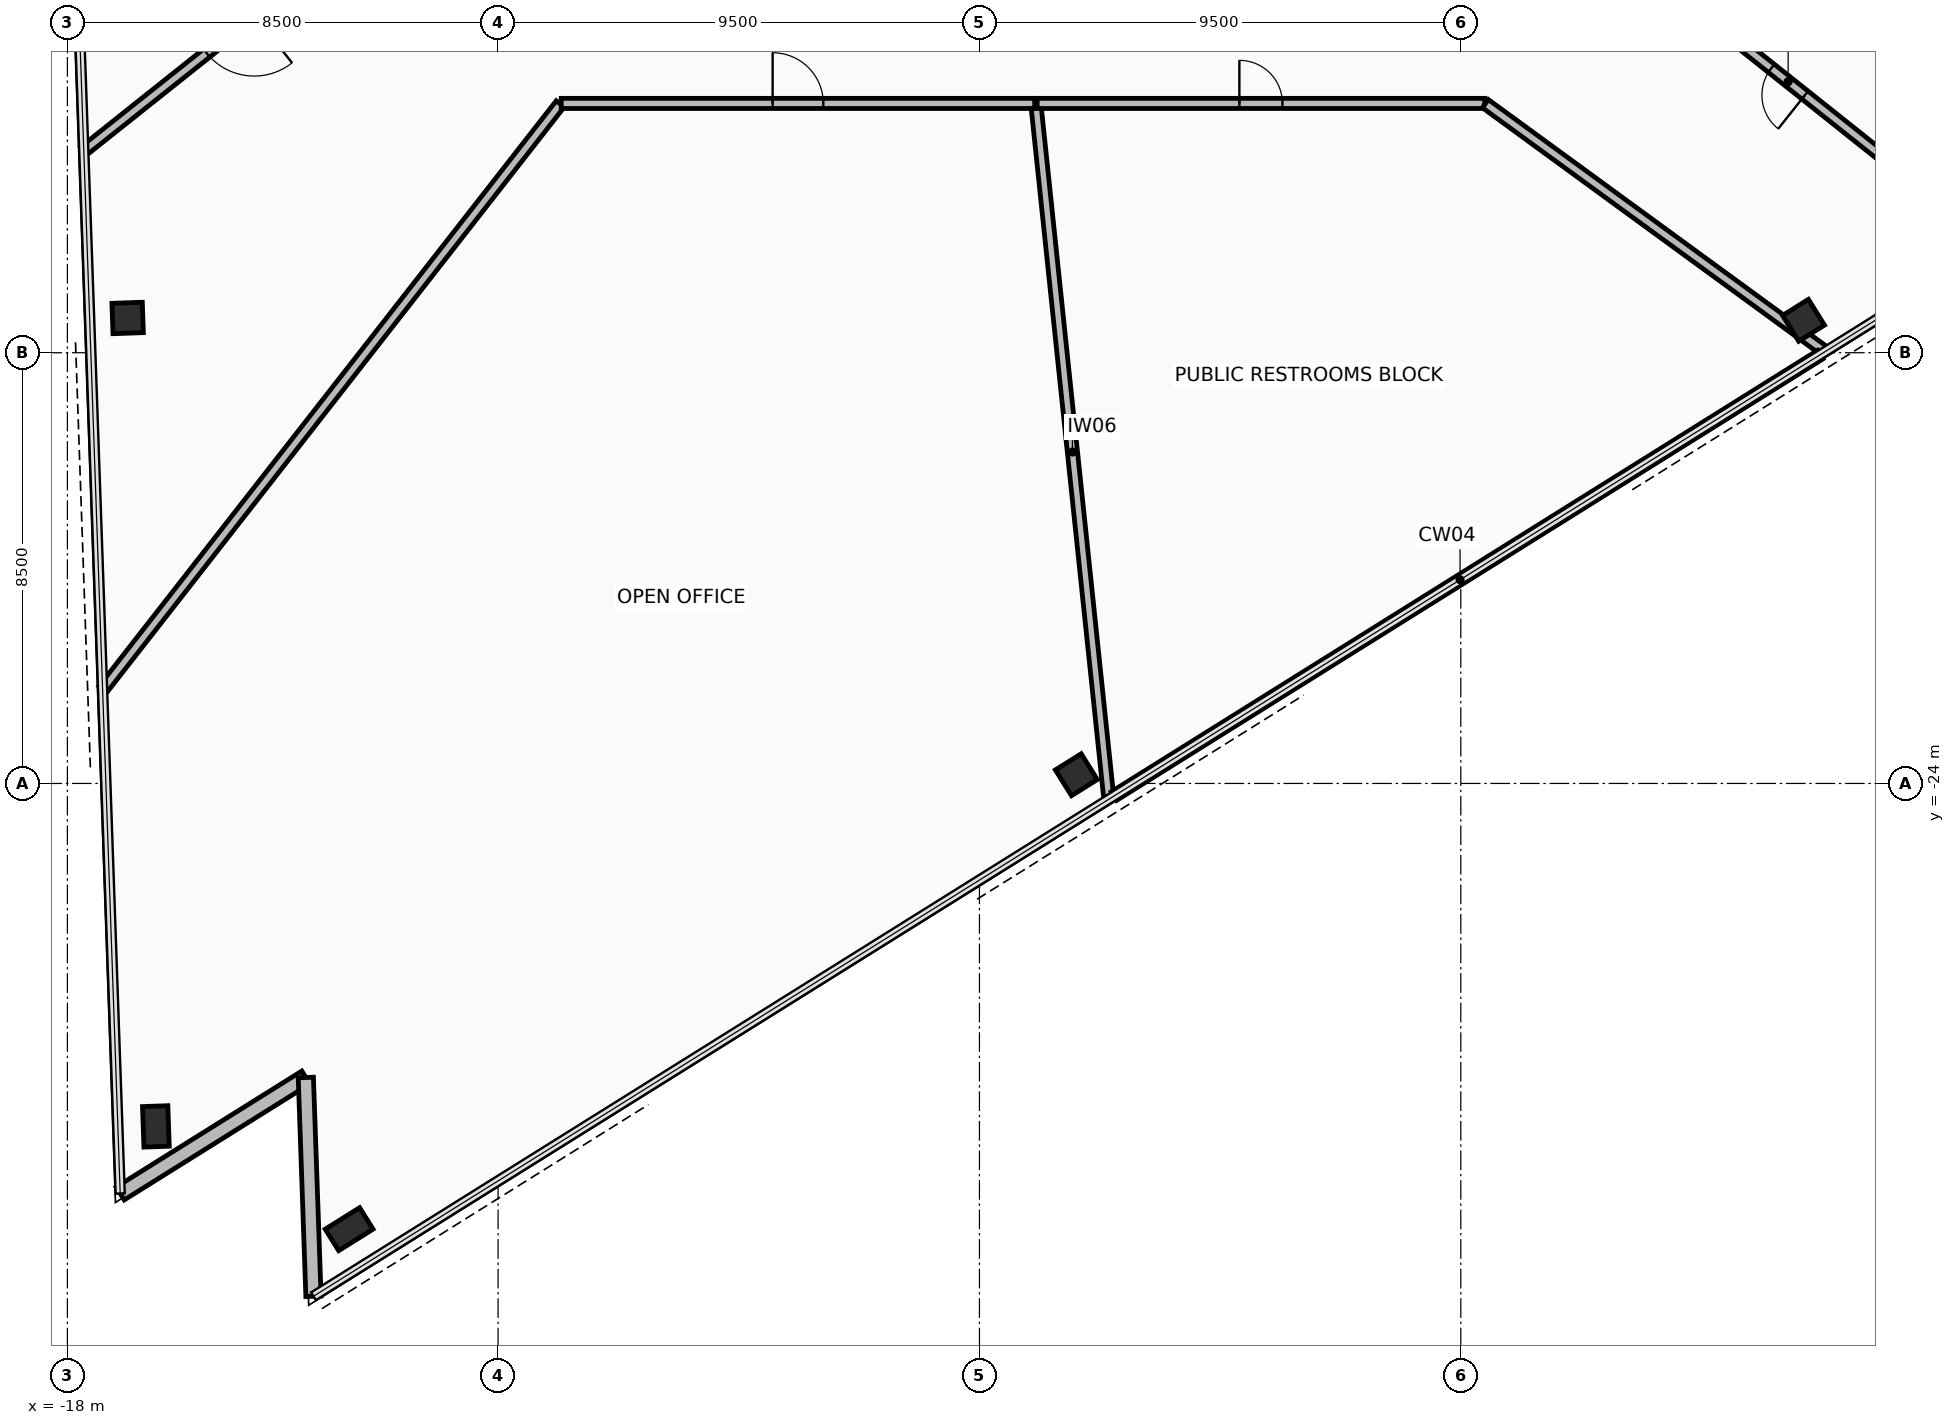
"""IFC4 building model, lengths in metres.
Left out: names, types, materials, properties, quantities, classifications, styles, units other than length and angle.
Written with IfcOpenShell. Run it as: python <this file> out.ifc"""

import sys

from ifc_helpers import new_model, si_unit, direction, frame, frame_2d, origin, origin_2d, place, context, subcontext, project, spatial, rectangle, hollow_rectangle, extrude, element, fill, save


model = new_model("IFC4")
c1 = context("Model", 3, precision=1e-05, world=origin(), true_north=direction((0.0, 1.0)))
c2 = subcontext(c1, "Body", "Model", "MODEL_VIEW")
j1 = project(units=[si_unit("LENGTHUNIT", "METRE"), si_unit("PLANEANGLEUNIT", "RADIAN")], contexts=[c1])
p1 = place(None, origin())
s1 = spatial("IfcSite", under=j1, at=p1, CompositionType="ELEMENT")
p2 = place(p1, origin())
s2 = spatial("IfcBuilding", under=s1, at=p2, CompositionType="ELEMENT")
p3 = place(p2, frame((0.0, 0.0, 138.8)))
s3 = spatial("IfcBuildingStorey", under=s2, at=p3, CompositionType="ELEMENT", Elevation=138.8)
p4 = place(p3, frame((-16.811, -14.814, 0.0), z_axis=(0.0, 0.0, 1.0), x_axis=(-0.034899496703, 0.999390827019, 0.0)))
e1 = element("IfcColumn", 1, at=p4, inside=s3, PredefinedType="COLUMN", context=c2, shape_type="SweptSolid", body=[
    extrude(hollow_rectangle(XDim=0.6, YDim=0.6, WallThickness=0.036, at=origin_2d()), origin(), (0.0, 0.0, 1.0), 3.6),
])
for number, where, z_axis, x_axis in (
    (2, (-16.254, -30.768, 0.0), (0.0, 0.0, 1.0), (-0.035, 0.999, 0.0)),
    (3, (-12.439, -32.796, 0.0), (0.0, 0.0, 1.0), (0.848, 0.53, 0.0)),
):
    element("IfcColumn", number, at=place(p3, frame(where, z_axis=z_axis, x_axis=x_axis)), inside=s3, PredefinedType="COLUMN", context=c2, shape_type="SweptSolid", body=[
        extrude(hollow_rectangle(XDim=0.5, YDim=0.8, WallThickness=0.04, at=origin_2d()), origin(), (0.0, 0.0, 1.0), 3.6),
    ])
p5 = place(p3, frame((1.912, -23.828, -0.19), z_axis=(0.0, 0.0, 1.0), x_axis=(0.848047171272, 0.529920744356, 0.0)))
e4 = element("IfcColumn", 4, at=p5, inside=s3, PredefinedType="COLUMN", context=c2, shape_type="SweptSolid", body=[
    extrude(hollow_rectangle(XDim=0.6, YDim=0.6, WallThickness=0.036, at=origin_2d()), origin(), (0.0, 0.0, 1.0), 3.79),
])
p6 = place(p3, frame((16.264, -14.86, 0.0), z_axis=(0.0, 0.0, 1.0), x_axis=(0.848047171272, 0.529920744356, 0.0)))
e5 = element("IfcColumn", 5, at=p6, inside=s3, PredefinedType="COLUMN", context=c2, shape_type="SweptSolid", body=[
    extrude(hollow_rectangle(XDim=0.6, YDim=0.6, WallThickness=0.036, at=origin_2d()), origin(), (0.0, 0.0, 1.0), 3.6),
])
p7 = place(p3, frame((-16.958, -32.092, 0.0), z_axis=(0.0, 0.0, 1.0), x_axis=(0.848068146975, 0.529887174866, 0.0)))
e6 = element("IfcWall", 6, at=p7, inside=s3, PredefinedType="STANDARD", context=c2, shape_type="SweptSolid", body=[
    extrude(rectangle(XDim=4.32, YDim=0.3, at=frame_2d((2.16, 0.0))), origin(), (0.0, 0.0, 1.0), 2.705),
])
p8 = place(p3, frame((-13.294, -29.803, 0.0), z_axis=(0.0, 0.0, 1.0), x_axis=(0.034869079132, -0.999391888761, 0.0)))
e7 = element("IfcWall", 7, at=p8, inside=s3, PredefinedType="STANDARD", context=c2, shape_type="SweptSolid", body=[
    extrude(rectangle(XDim=4.32, YDim=0.3, at=frame_2d((2.16, 0.0))), origin(), (0.0, 0.0, 1.0), 2.705),
])
p9 = place(p3, frame((2.555, -24.311, 0.0), z_axis=(0.0, 0.0, 1.0), x_axis=(-0.104523371889, 0.994522430481, 0.0)))
e8 = element("IfcWall", 8, at=p9, inside=s3, PredefinedType="PARTITIONING", context=c2, shape_type="SweptSolid", body=[
    extrude(rectangle(XDim=13.779, YDim=0.2, at=frame_2d((6.889, 0.0))), origin(), (0.0, 0.0, 1.0), 2.705),
])
p10 = place(p3, frame((1.14, -10.58, 0.0), z_axis=(0.0, 0.0, 1.0), x_axis=(1.0, 0.0, 0.0)))
e9 = element("IfcWall", 9, at=p10, inside=s3, PredefinedType="PARTITIONING", context=c2, shape_type="SweptSolid", body=[
    extrude(rectangle(XDim=8.83, YDim=0.2, at=frame_2d((4.415, 0.0))), origin(), (0.0, 0.0, 1.0), 3.41),
])
p11 = place(p10, frame((3.99, 0.0, 0.0)))
e10 = element("IfcOpeningElement", 10, at=p11, cuts=e9, PredefinedType="OPENING", context=c2, shape_type="SweptSolid", body=[
    extrude(rectangle(XDim=0.85, YDim=2.1, at=frame_2d((0.425, 1.05))), frame((0.0, 0.11, 0.0), z_axis=(0.0, -1.0, 0.0), x_axis=(1.0, 0.0, 0.0)), (0.0, 0.0, 1.0), 0.22),
])
p12 = place(p3, frame((9.985, -10.585, 0.0), z_axis=(0.0, 0.0, 1.0), x_axis=(0.807835985814, -0.589407346429, 0.0)))
e11 = element("IfcWall", 11, at=p12, inside=s3, PredefinedType="PARTITIONING", context=c2, shape_type="SweptSolid", body=[
    extrude(rectangle(XDim=8.301, YDim=0.2, at=frame_2d((4.151, 0.0))), origin(), (0.0, 0.0, 1.0), 2.705),
])
p13 = place(p3, frame((16.595, -15.538, 0.0), z_axis=(0.0, 0.0, 1.0), x_axis=(-0.84805002989, -0.5299161696, 0.0)))
e12 = element("IfcWall", 12, at=p13, inside=s3, PredefinedType="PARTITIONING", context=c2, shape_type="SweptSolid", body=[
    extrude(rectangle(XDim=16.439, YDim=0.2, at=frame_2d((8.219, 0.0))), origin(), (0.0, 0.0, 1.0), 3.41),
])
p14 = place(p3, frame((20.03, -13.391, 0.0), z_axis=(0.0, 0.0, 1.0), x_axis=(-0.782379652936, 0.622801797261, 0.0)))
e13 = element("IfcWall", 13, at=p14, inside=s3, PredefinedType="PARTITIONING", context=c2, shape_type="SweptSolid", body=[
    extrude(rectangle(XDim=10.405, YDim=0.2, at=frame_2d((5.203, 0.0))), origin(), (0.0, 0.0, 1.0), 2.705),
])
p15 = place(p14, frame((4.777, 0.0, 0.0)))
e14 = element("IfcOpeningElement", 14, at=p15, cuts=e13, PredefinedType="OPENING", context=c2, shape_type="SweptSolid", body=[
    extrude(rectangle(XDim=0.85, YDim=2.1, at=frame_2d((0.425, 1.05))), frame((0.0, 0.11, 0.0), z_axis=(0.0, -1.0, 0.0), x_axis=(1.0, 0.0, 0.0)), (0.0, 0.0, 1.0), 0.22),
])
p16 = place(p3, frame((-11.889, -6.911, 0.0), z_axis=(0.0, 0.0, 1.0), x_axis=(-0.782386471956, -0.622793230936, 0.0)))
e15 = element("IfcWall", 15, at=p16, inside=s3, PredefinedType="PARTITIONING", context=c2, shape_type="SweptSolid", body=[
    extrude(rectangle(XDim=7.396, YDim=0.2, at=frame_2d((3.698, 0.0))), origin(), (0.0, 0.0, 1.0), 2.705),
])
p17 = place(p16, frame((3.098, 0.0, 0.0)))
e16 = element("IfcOpeningElement", 16, at=p17, cuts=e15, PredefinedType="OPENING", context=c2, shape_type="SweptSolid", body=[
    extrude(rectangle(XDim=1.2, YDim=2.15, at=frame_2d((0.6, 1.075))), frame((0.0, 0.11, 0.0), z_axis=(0.0, -1.0, 0.0), x_axis=(1.0, 0.0, 0.0)), (0.0, 0.0, 1.0), 0.22),
])
p18 = place(p3, frame((-17.299, -22.142, 0.0), z_axis=(0.0, 0.0, 1.0), x_axis=(0.615665047481, 0.78800796272, 0.0)))
e17 = element("IfcWall", 17, at=p18, inside=s3, PredefinedType="PARTITIONING", context=c2, shape_type="SweptSolid", body=[
    extrude(rectangle(XDim=14.66, YDim=0.2, at=frame_2d((7.33, 0.0))), origin(), (0.0, 0.0, 1.0), 2.705),
])
p19 = place(p3, frame((-8.254, -10.58, 0.0), z_axis=(0.0, 0.0, 1.0), x_axis=(1.0, 0.0, 0.0)))
e18 = element("IfcWall", 18, at=p19, inside=s3, PredefinedType="PARTITIONING", context=c2, shape_type="SweptSolid", body=[
    extrude(rectangle(XDim=9.344, YDim=0.2, at=frame_2d((4.672, 0.0))), origin(), (0.0, 0.0, 1.0), 2.855),
])
p20 = place(p19, frame((4.172, 0.0, 0.0)))
e19 = element("IfcOpeningElement", 19, at=p20, cuts=e18, PredefinedType="OPENING", context=c2, shape_type="SweptSolid", body=[
    extrude(rectangle(XDim=1.0, YDim=2.15, at=frame_2d((0.5, 1.075))), frame((0.0, 0.11, 0.0), z_axis=(0.0, -1.0, 0.0), x_axis=(1.0, 0.0, 0.0)), (0.0, 0.0, 1.0), 0.22),
])
p21 = place(p11, origin())
e20 = element("IfcDoor", 20, at=p21, inside=s3, OperationType="SINGLE_SWING_RIGHT", PredefinedType="DOOR", context=c2, shape_type="SweptSolid", body=[
    extrude(rectangle(XDim=0.85, YDim=2.1, at=frame_2d((0.425, 1.05))), frame((0.0, 0.025, 0.0), z_axis=(0.0, -1.0, 0.0), x_axis=(1.0, 0.0, 0.0)), (0.0, 0.0, 1.0), 0.05),
])
fill(e10, e20)
p22 = place(p15, origin())
e21 = element("IfcDoor", 21, at=p22, inside=s3, OperationType="SINGLE_SWING_RIGHT", PredefinedType="DOOR", context=c2, shape_type="SweptSolid", body=[
    extrude(rectangle(XDim=0.85, YDim=2.1, at=frame_2d((0.425, 1.05))), frame((0.0, 0.025, 0.0), z_axis=(0.0, -1.0, 0.0), x_axis=(1.0, 0.0, 0.0)), (0.0, 0.0, 1.0), 0.05),
])
fill(e14, e21)
p23 = place(p17, origin())
e22 = element("IfcDoor", 22, at=p23, inside=s3, OperationType="SINGLE_SWING_LEFT", PredefinedType="DOOR", context=c2, shape_type="SweptSolid", body=[
    extrude(rectangle(XDim=1.2, YDim=2.15, at=frame_2d((0.6, 1.075))), frame((0.0, 0.025, 0.0), z_axis=(0.0, -1.0, 0.0), x_axis=(1.0, 0.0, 0.0)), (0.0, 0.0, 1.0), 0.05),
])
fill(e16, e22)
p24 = place(p20, origin())
e23 = element("IfcDoor", 23, at=p24, inside=s3, OperationType="SINGLE_SWING_RIGHT", PredefinedType="DOOR", context=c2, shape_type="SweptSolid", body=[
    extrude(rectangle(XDim=1.0, YDim=2.15, at=frame_2d((0.5, 1.075))), frame((0.0, 0.025, 0.0), z_axis=(0.0, -1.0, 0.0), x_axis=(1.0, 0.0, 0.0)), (0.0, 0.0, 1.0), 0.05),
])
fill(e19, e23)
save(model, sys.argv[1])
